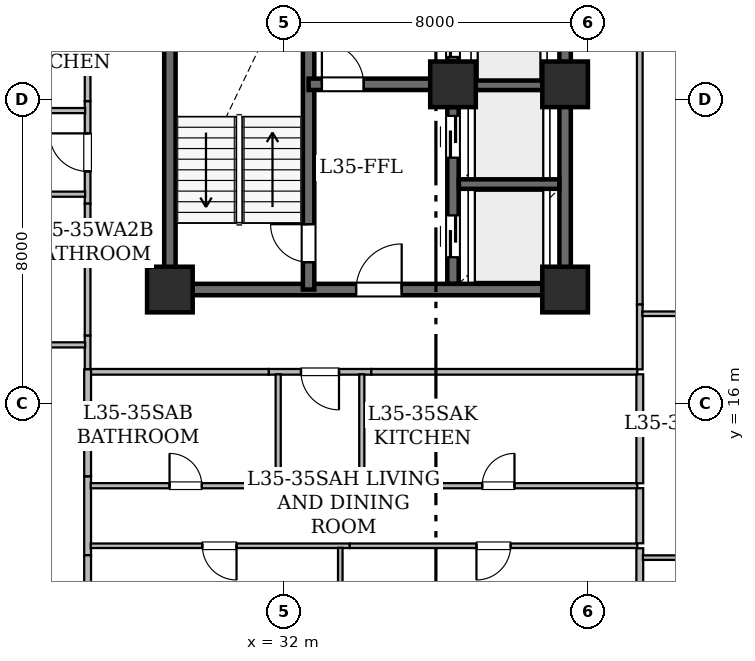
"""IFC4 building model, lengths in metres.
Left out: names, types, materials, properties, quantities, classifications, styles, units other than length and angle.
Written with IfcOpenShell. Run it as: python <this file> out.ifc"""

import sys

from ifc_helpers import new_model, si_unit, direction, frame, frame_2d, origin, origin_2d, place, context, subcontext, project, spatial, rectangle, hollow_rectangle, extrude, element, fill, save


model = new_model("IFC4")
c1 = context("Model", 3, precision=1e-05, world=origin(), true_north=direction((0.0, 1.0)))
c2 = subcontext(c1, "Body", "Model", "MODEL_VIEW")
j1 = project(units=[si_unit("LENGTHUNIT", "METRE"), si_unit("PLANEANGLEUNIT", "RADIAN")], contexts=[c1])
p1 = place(None, origin())
s1 = spatial("IfcSite", under=j1, at=p1, CompositionType="ELEMENT")
p2 = place(p1, origin())
s2 = spatial("IfcBuilding", under=s1, at=p2, CompositionType="ELEMENT")
p3 = place(p2, frame((0.0, 0.0, 138.4)))
s3 = spatial("IfcBuildingStorey", under=s2, at=p3, CompositionType="ELEMENT", Elevation=138.4)
for number, where, z_axis, x_axis in (
    (1, (29.0, 19.0, 0.0), (0.0, 0.0, 1.0), (1.0, 0.0, 0.0)),
    (2, (39.4, 19.0, 0.0), (0.0, 0.0, 1.0), (1.0, 0.0, 0.0)),
    (3, (36.45, 24.4, 0.0), (0.0, 0.0, 1.0), (1.0, 0.0, 0.0)),
    (4, (39.4, 24.4, 0.0), (0.0, 0.0, 1.0), (1.0, 0.0, 0.0)),
):
    element("IfcColumn", number, at=place(p3, frame(where, z_axis=z_axis, x_axis=x_axis)), inside=s3, PredefinedType="COLUMN", context=c2, shape_type="SweptSolid", body=[
        extrude(hollow_rectangle(XDim=1.2, YDim=1.2, WallThickness=0.06, at=origin_2d()), origin(), (0.0, 0.0, 1.0), 3.65),
    ])
p4 = place(p3, frame((29.0, 19.0, 0.0), z_axis=(0.0, 0.0, 1.0), x_axis=(0.0, 1.0, 0.0)))
e5 = element("IfcWall", 5, at=p4, inside=s3, PredefinedType="SHEAR", context=c2, shape_type="SweptSolid", body=[
    extrude(rectangle(XDim=9.0, YDim=0.3, at=frame_2d((4.5, 0.0))), origin(), (0.0, 0.0, 1.0), 3.43),
])
p5 = place(p3, frame((29.0, 19.0, 0.0), z_axis=(0.0, 0.0, 1.0), x_axis=(1.0, 0.0, 0.0)))
e6 = element("IfcWall", 6, at=p5, inside=s3, PredefinedType="SHEAR", context=c2, shape_type="SweptSolid", body=[
    extrude(rectangle(XDim=10.4, YDim=0.3, at=frame_2d((5.2, 0.0))), origin(), (0.0, 0.0, 1.0), 3.43),
])
p6 = place(p5, frame((4.9, 0.0, 0.0)))
e7 = element("IfcOpeningElement", 7, at=p6, cuts=e6, PredefinedType="OPENING", context=c2, shape_type="SweptSolid", body=[
    extrude(rectangle(XDim=1.2, YDim=2.15, at=frame_2d((0.6, 1.075))), frame((0.0, 0.16, 0.0), z_axis=(0.0, -1.0, 0.0), x_axis=(1.0, 0.0, 0.0)), (0.0, 0.0, 1.0), 0.32),
])
p7 = place(p3, frame((39.4, 19.0, 0.0), z_axis=(0.0, 0.0, 1.0), x_axis=(0.0, 1.0, 0.0)))
e8 = element("IfcWall", 8, at=p7, inside=s3, PredefinedType="SHEAR", context=c2, shape_type="SweptSolid", body=[
    extrude(rectangle(XDim=5.4, YDim=0.3, at=frame_2d((2.7, 0.0))), origin(), (0.0, 0.0, 1.0), 3.43),
])
p8 = place(p3, frame((39.4, 24.4, 0.0), z_axis=(0.0, 0.0, 1.0), x_axis=(0.0, 1.0, 0.0)))
e9 = element("IfcWall", 9, at=p8, inside=s3, PredefinedType="SHEAR", context=c2, shape_type="SweptSolid", body=[
    extrude(rectangle(XDim=12.6, YDim=0.3, at=frame_2d((6.3, 0.0))), origin(), (0.0, 0.0, 1.0), 3.43),
])
p9 = place(p3, frame((32.65, 19.0, 0.0), z_axis=(0.0, 0.0, 1.0), x_axis=(0.0, 1.0, 0.0)))
e10 = element("IfcWall", 10, at=p9, inside=s3, PredefinedType="SHEAR", context=c2, shape_type="SweptSolid", body=[
    extrude(rectangle(XDim=9.0, YDim=0.3, at=frame_2d((4.5, 0.0))), origin(), (0.0, 0.0, 1.0), 3.43),
])
p10 = place(p9, frame((0.72, 0.0, 0.0)))
e11 = element("IfcOpeningElement", 11, at=p10, cuts=e10, PredefinedType="OPENING", context=c2, shape_type="SweptSolid", body=[
    extrude(rectangle(XDim=1.0, YDim=2.15, at=frame_2d((0.5, 1.075))), frame((0.0, 0.16, 0.0), z_axis=(0.0, -1.0, 0.0), x_axis=(1.0, 0.0, 0.0)), (0.0, 0.0, 1.0), 0.32),
])
p11 = place(p3, frame((32.65, 24.4, 0.0), z_axis=(0.0, 0.0, 1.0), x_axis=(1.0, 0.0, 0.0)))
e12 = element("IfcWall", 12, at=p11, inside=s3, PredefinedType="SHEAR", context=c2, shape_type="SweptSolid", body=[
    extrude(rectangle(XDim=3.8, YDim=0.3, at=frame_2d((1.9, 0.0))), origin(), (0.0, 0.0, 1.0), 3.43),
])
p12 = place(p11, frame((0.35, 0.0, 0.0)))
e13 = element("IfcOpeningElement", 13, at=p12, cuts=e12, PredefinedType="OPENING", context=c2, shape_type="SweptSolid", body=[
    extrude(rectangle(XDim=1.1, YDim=2.15, at=frame_2d((0.55, 1.075))), frame((0.0, 0.16, 0.0), z_axis=(0.0, -1.0, 0.0), x_axis=(1.0, 0.0, 0.0)), (0.0, 0.0, 1.0), 0.32),
])
p13 = place(p3, frame((36.45, 19.154, 0.0), z_axis=(0.0, 0.0, 1.0), x_axis=(0.0, 1.0, 0.0)))
e14 = element("IfcWall", 14, at=p13, inside=s3, PredefinedType="SHEAR", context=c2, shape_type="SweptSolid", body=[
    extrude(rectangle(XDim=4.646, YDim=0.3, at=frame_2d((2.323, 0.0))), origin(), (0.0, 0.0, 1.0), 3.43),
])
p14 = place(p13, frame((0.696, 0.0, 0.0)))
e15 = element("IfcOpeningElement", 15, at=p14, cuts=e14, PredefinedType="OPENING", context=c2, shape_type="SweptSolid", body=[
    extrude(rectangle(XDim=1.1, YDim=2.15, at=frame_2d((0.55, 1.075))), frame((0.0, 0.16, 0.0), z_axis=(0.0, -1.0, 0.0), x_axis=(1.0, 0.0, 0.0)), (0.0, 0.0, 1.0), 0.32),
])
p15 = place(p13, frame((3.316, 0.0, 0.0)))
e16 = element("IfcOpeningElement", 16, at=p15, cuts=e14, PredefinedType="OPENING", context=c2, shape_type="SweptSolid", body=[
    extrude(rectangle(XDim=1.1, YDim=2.15, at=frame_2d((0.55, 1.075))), frame((0.0, 0.16, 0.0), z_axis=(0.0, -1.0, 0.0), x_axis=(1.0, 0.0, 0.0)), (0.0, 0.0, 1.0), 0.32),
])
p16 = place(p3, frame((36.45, 25.0, 0.0), z_axis=(0.0, 0.0, 1.0), x_axis=(0.0, 1.0, 0.0)))
e17 = element("IfcWall", 17, at=p16, inside=s3, PredefinedType="SHEAR", context=c2, shape_type="SweptSolid", body=[
    extrude(rectangle(XDim=5.15, YDim=0.3, at=frame_2d((2.575, 0.0))), origin(), (0.0, 0.0, 1.0), 3.43),
])
p17 = place(p16, frame((0.12, 0.0, 0.0)))
e18 = element("IfcOpeningElement", 18, at=p17, cuts=e17, PredefinedType="OPENING", context=c2, shape_type="SweptSolid", body=[
    extrude(rectangle(XDim=1.05, YDim=2.15, at=frame_2d((0.525, 1.075))), frame((0.0, 0.16, 0.0), z_axis=(0.0, -1.0, 0.0), x_axis=(1.0, 0.0, 0.0)), (0.0, 0.0, 1.0), 0.32),
])
p18 = place(p16, frame((2.095, 0.0, 0.0)))
e19 = element("IfcOpeningElement", 19, at=p18, cuts=e17, PredefinedType="OPENING", context=c2, shape_type="SweptSolid", body=[
    extrude(rectangle(XDim=1.05, YDim=2.15, at=frame_2d((0.525, 1.075))), frame((0.0, 0.16, 0.0), z_axis=(0.0, -1.0, 0.0), x_axis=(1.0, 0.0, 0.0)), (0.0, 0.0, 1.0), 0.32),
])
p19 = place(p16, frame((3.98, 0.0, 0.0)))
e20 = element("IfcOpeningElement", 20, at=p19, cuts=e17, PredefinedType="OPENING", context=c2, shape_type="SweptSolid", body=[
    extrude(rectangle(XDim=1.05, YDim=2.15, at=frame_2d((0.525, 1.075))), frame((0.0, 0.16, 0.0), z_axis=(0.0, -1.0, 0.0), x_axis=(1.0, 0.0, 0.0)), (0.0, 0.0, 1.0), 0.32),
])
for number, where, z_axis, x_axis in (
    (21, (36.604, 21.775, 0.0), (0.0, 0.0, 1.0), (1.0, 0.0, 0.0)),
    (22, (36.604, 24.375, 0.0), (0.0, 0.0, 1.0), (1.0, 0.0, 0.0)),
):
    element("IfcWall", number, at=place(p3, frame(where, z_axis=z_axis, x_axis=x_axis)), inside=s3, PredefinedType="SHEAR", context=c2, shape_type="SweptSolid", body=[
        extrude(rectangle(XDim=2.642, YDim=0.25, at=frame_2d((1.321, 0.0))), origin(), (0.0, 0.0, 1.0), 3.43),
    ])
p20 = place(p3, frame((26.835, 16.9, 0.0), z_axis=(0.0, 0.0, 1.0), x_axis=(0.0, 1.0, 0.0)))
e23 = element("IfcWall", 23, at=p20, inside=s3, PredefinedType="STANDARD", context=c2, shape_type="SweptSolid", body=[
    extrude(rectangle(XDim=0.893, YDim=0.15, at=frame_2d((0.447, 0.0))), origin(), (0.0, 0.0, 1.0), 3.43),
])
p21 = place(p3, frame((26.835, 21.26, 0.0), z_axis=(0.0, 0.0, 1.0), x_axis=(0.0, 1.0, 0.0)))
e24 = element("IfcWall", 24, at=p21, inside=s3, PredefinedType="STANDARD", context=c2, shape_type="SweptSolid", body=[
    extrude(rectangle(XDim=2.698, YDim=0.15, at=frame_2d((1.349, 0.0))), origin(), (0.0, 0.0, 1.0), 3.43),
])
p22 = place(p21, frame((0.849, 0.0, 0.0)))
e25 = element("IfcOpeningElement", 25, at=p22, cuts=e24, PredefinedType="OPENING", context=c2, shape_type="SweptSolid", body=[
    extrude(rectangle(XDim=1.0, YDim=2.15, at=frame_2d((0.5, 1.075))), frame((0.0, 0.085, 0.0), z_axis=(0.0, -1.0, 0.0), x_axis=(1.0, 0.0, 0.0)), (0.0, 0.0, 1.0), 0.17),
])
p23 = place(p3, frame((26.835, 17.793, 0.0), z_axis=(0.0, 0.0, 1.0), x_axis=(0.0, 1.0, 0.0)))
e26 = element("IfcWall", 26, at=p23, inside=s3, PredefinedType="STANDARD", context=c2, shape_type="SweptSolid", body=[
    extrude(rectangle(XDim=3.467, YDim=0.15, at=frame_2d((1.733, 0.0))), origin(), (0.0, 0.0, 1.0), 2.647),
])
p24 = place(p3, frame((26.835, 23.958, 0.0), z_axis=(0.0, 0.0, 1.0), x_axis=(0.0, 1.0, 0.0)))
e27 = element("IfcWall", 27, at=p24, inside=s3, PredefinedType="STANDARD", context=c2, shape_type="SweptSolid", body=[
    extrude(rectangle(XDim=6.992, YDim=0.15, at=frame_2d((3.496, 0.0))), origin(), (0.0, 0.0, 1.0), 3.013),
])
p25 = place(p3, frame((34.299, 16.835, 0.0), z_axis=(0.0, 0.0, 1.0), x_axis=(-1.0, 0.0, 0.0)))
e28 = element("IfcWall", 28, at=p25, inside=s3, PredefinedType="STANDARD", context=c2, shape_type="SweptSolid", body=[
    extrude(rectangle(XDim=2.698, YDim=0.15, at=frame_2d((1.349, 0.0))), origin(), (0.0, 0.0, 1.0), 3.43),
])
p26 = place(p25, frame((0.849, 0.0, 0.0)))
e29 = element("IfcOpeningElement", 29, at=p26, cuts=e28, PredefinedType="OPENING", context=c2, shape_type="SweptSolid", body=[
    extrude(rectangle(XDim=1.0, YDim=2.15, at=frame_2d((0.5, 1.075))), frame((0.0, 0.085, 0.0), z_axis=(0.0, -1.0, 0.0), x_axis=(1.0, 0.0, 0.0)), (0.0, 0.0, 1.0), 0.17),
])
p27 = place(p3, frame((31.601, 16.835, 0.0), z_axis=(0.0, 0.0, 1.0), x_axis=(-1.0, 0.0, 0.0)))
e30 = element("IfcWall", 30, at=p27, inside=s3, PredefinedType="STANDARD", context=c2, shape_type="SweptSolid", body=[
    extrude(rectangle(XDim=4.701, YDim=0.15, at=frame_2d((2.351, 0.0))), origin(), (0.0, 0.0, 1.0), 2.647),
])
p28 = place(p3, frame((41.3, 16.835, 0.0), z_axis=(0.0, 0.0, 1.0), x_axis=(-1.0, 0.0, 0.0)))
e31 = element("IfcWall", 31, at=p28, inside=s3, PredefinedType="STANDARD", context=c2, shape_type="SweptSolid", body=[
    extrude(rectangle(XDim=7.001, YDim=0.15, at=frame_2d((3.5, 0.0))), origin(), (0.0, 0.0, 1.0), 2.647),
])
p29 = place(p3, frame((41.365, 18.612, 0.0), z_axis=(0.0, 0.0, 1.0), x_axis=(0.0, -1.0, 0.0)))
e32 = element("IfcWall", 32, at=p29, inside=s3, PredefinedType="STANDARD", context=c2, shape_type="SweptSolid", body=[
    extrude(rectangle(XDim=1.712, YDim=0.15, at=frame_2d((0.856, 0.0))), origin(), (0.0, 0.0, 1.0), 2.647),
])
p30 = place(p3, frame((41.365, 25.576, 0.0), z_axis=(0.0, 0.0, 1.0), x_axis=(0.0, -1.0, 0.0)))
e33 = element("IfcWall", 33, at=p30, inside=s3, PredefinedType="STANDARD", context=c2, shape_type="SweptSolid", body=[
    extrude(rectangle(XDim=6.964, YDim=0.15, at=frame_2d((3.482, 0.0))), origin(), (0.0, 0.0, 1.0), 2.647),
])
p31 = place(p3, frame((24.163, 17.544, 0.0), z_axis=(0.0, 0.0, 1.0), x_axis=(1.0, 0.0, 0.0)))
e34 = element("IfcWall", 34, at=p31, inside=s3, PredefinedType="PARTITIONING", context=c2, shape_type="SweptSolid", body=[
    extrude(rectangle(XDim=2.607, YDim=0.135, at=frame_2d((1.303, 0.0))), origin(), (0.0, 0.0, 1.0), 3.43),
])
p32 = place(p3, frame((26.835, 14.087, 0.0), z_axis=(0.0, 0.0, 1.0), x_axis=(0.0, -1.0, 0.0)))
e35 = element("IfcWall", 35, at=p32, inside=s3, PredefinedType="STANDARD", context=c2, shape_type="SweptSolid", body=[
    extrude(rectangle(XDim=2.078, YDim=0.18, at=frame_2d((1.039, 0.0))), origin(), (0.0, 0.0, 1.0), 3.43),
])
p33 = place(p3, frame((26.835, 16.9, 0.0), z_axis=(0.0, 0.0, 1.0), x_axis=(0.0, -1.0, 0.0)))
e36 = element("IfcWall", 36, at=p33, inside=s3, PredefinedType="STANDARD", context=c2, shape_type="SweptSolid", body=[
    extrude(rectangle(XDim=2.813, YDim=0.18, at=frame_2d((1.406, 0.0))), origin(), (0.0, 0.0, 1.0), 3.43),
])
p34 = place(p3, frame((26.835, 12.009, 0.0), z_axis=(0.0, 0.0, 1.0), x_axis=(0.0, -1.0, 0.0)))
e37 = element("IfcWall", 37, at=p34, inside=s3, PredefinedType="STANDARD", context=c2, shape_type="SweptSolid", body=[
    extrude(rectangle(XDim=5.397, YDim=0.18, at=frame_2d((2.698, 0.0))), origin(), (0.0, 0.0, 1.0), 2.876),
])
for number, where, z_axis, x_axis in (
    (38, (26.77, 21.509, 0.0), (0.0, 0.0, 1.0), (-1.0, 0.0, 0.0)),
    (39, (24.033, 23.709, 0.0), (0.0, 0.0, 1.0), (1.0, 0.0, 0.0)),
):
    element("IfcWall", number, at=place(p3, frame(where, z_axis=z_axis, x_axis=x_axis)), inside=s3, PredefinedType="PARTITIONING", context=c2, shape_type="SweptSolid", body=[
        extrude(rectangle(XDim=2.737, YDim=0.135, at=frame_2d((1.369, 0.0))), origin(), (0.0, 0.0, 1.0), 3.43),
    ])
p35 = place(p3, frame((26.917, 13.838, 0.0), z_axis=(0.0, 0.0, 1.0), x_axis=(1.0, 0.0, 0.0)))
e40 = element("IfcWall", 40, at=p35, inside=s3, PredefinedType="PARTITIONING", context=c2, shape_type="SweptSolid", body=[
    extrude(rectangle(XDim=4.998, YDim=0.135, at=frame_2d((2.499, 0.0))), origin(), (0.0, 0.0, 1.0), 2.647),
])
p36 = place(p35, frame((2.074, 0.0, 0.0)))
e41 = element("IfcOpeningElement", 41, at=p36, cuts=e40, PredefinedType="OPENING", context=c2, shape_type="SweptSolid", body=[
    extrude(rectangle(XDim=0.85, YDim=2.1, at=frame_2d((0.425, 1.05))), frame((0.0, 0.077, 0.0), z_axis=(0.0, -1.0, 0.0), x_axis=(1.0, 0.0, 0.0)), (0.0, 0.0, 1.0), 0.155),
])
for number, where, z_axis, x_axis in (
    (42, (31.85, 13.773, 0.0), (0.0, 0.0, 1.0), (0.0, 1.0, 0.0)),
    (43, (34.05, 16.77, 0.0), (0.0, 0.0, 1.0), (0.0, -1.0, 0.0)),
):
    element("IfcWall", number, at=place(p3, frame(where, z_axis=z_axis, x_axis=x_axis)), inside=s3, PredefinedType="PARTITIONING", context=c2, shape_type="SweptSolid", body=[
        extrude(rectangle(XDim=2.997, YDim=0.135, at=frame_2d((1.499, 0.0))), origin(), (0.0, 0.0, 1.0), 3.43),
    ])
p37 = place(p3, frame((33.985, 13.838, 0.0), z_axis=(0.0, 0.0, 1.0), x_axis=(1.0, 0.0, 0.0)))
e44 = element("IfcWall", 44, at=p37, inside=s3, PredefinedType="PARTITIONING", context=c2, shape_type="SweptSolid", body=[
    extrude(rectangle(XDim=7.315, YDim=0.135, at=frame_2d((3.657, 0.0))), origin(), (0.0, 0.0, 1.0), 2.647),
])
p38 = place(p37, frame((3.233, 0.0, 0.0)))
e45 = element("IfcOpeningElement", 45, at=p38, cuts=e44, PredefinedType="OPENING", context=c2, shape_type="SweptSolid", body=[
    extrude(rectangle(XDim=0.85, YDim=2.1, at=frame_2d((0.425, 1.05))), frame((0.0, 0.077, 0.0), z_axis=(0.0, -1.0, 0.0), x_axis=(1.0, 0.0, 0.0)), (0.0, 0.0, 1.0), 0.155),
])
p39 = place(p3, frame((33.734, 12.258, 0.0), z_axis=(0.0, 0.0, 1.0), x_axis=(-1.0, 0.0, 0.0)))
e46 = element("IfcWall", 46, at=p39, inside=s3, PredefinedType="PARTITIONING", context=c2, shape_type="SweptSolid", body=[
    extrude(rectangle(XDim=6.817, YDim=0.12, at=frame_2d((3.408, 0.0))), origin(), (0.0, 0.0, 1.0), 2.647),
])
p40 = place(p39, frame((2.98, 0.0, 0.0)))
e47 = element("IfcOpeningElement", 47, at=p40, cuts=e46, PredefinedType="OPENING", context=c2, shape_type="SweptSolid", body=[
    extrude(rectangle(XDim=0.9, YDim=2.1, at=frame_2d((0.45, 1.05))), frame((0.0, 0.07, 0.0), z_axis=(0.0, -1.0, 0.0), x_axis=(1.0, 0.0, 0.0)), (0.0, 0.0, 1.0), 0.14),
])
p41 = place(p3, frame((41.3, 12.258, 0.0), z_axis=(0.0, 0.0, 1.0), x_axis=(-1.0, 0.0, 0.0)))
e48 = element("IfcWall", 48, at=p41, inside=s3, PredefinedType="PARTITIONING", context=c2, shape_type="SweptSolid", body=[
    extrude(rectangle(XDim=7.566, YDim=0.12, at=frame_2d((3.783, 0.0))), origin(), (0.0, 0.0, 1.0), 2.647),
])
p42 = place(p41, frame((3.333, 0.0, 0.0)))
e49 = element("IfcOpeningElement", 49, at=p42, cuts=e48, PredefinedType="OPENING", context=c2, shape_type="SweptSolid", body=[
    extrude(rectangle(XDim=0.9, YDim=2.1, at=frame_2d((0.45, 1.05))), frame((0.0, 0.07, 0.0), z_axis=(0.0, -1.0, 0.0), x_axis=(1.0, 0.0, 0.0)), (0.0, 0.0, 1.0), 0.14),
])
p43 = place(p3, frame((41.365, 13.773, 0.0), z_axis=(0.0, 0.0, 1.0), x_axis=(0.0, -1.0, 0.0)))
e50 = element("IfcWall", 50, at=p43, inside=s3, PredefinedType="STANDARD", context=c2, shape_type="SweptSolid", body=[
    extrude(rectangle(XDim=1.45, YDim=0.18, at=frame_2d((0.725, 0.0))), origin(), (0.0, 0.0, 1.0), 3.43),
])
p44 = place(p3, frame((41.365, 16.77, 0.0), z_axis=(0.0, 0.0, 1.0), x_axis=(0.0, -1.0, 0.0)))
e51 = element("IfcWall", 51, at=p44, inside=s3, PredefinedType="STANDARD", context=c2, shape_type="SweptSolid", body=[
    extrude(rectangle(XDim=2.867, YDim=0.18, at=frame_2d((1.434, 0.0))), origin(), (0.0, 0.0, 1.0), 3.43),
])
p45 = place(p3, frame((33.484, 12.204, 0.0), z_axis=(0.0, 0.0, 1.0), x_axis=(0.0, -1.0, 0.0)))
e52 = element("IfcWall", 52, at=p45, inside=s3, PredefinedType="PARTITIONING", context=c2, shape_type="SweptSolid", body=[
    extrude(rectangle(XDim=5.592, YDim=0.12, at=frame_2d((2.796, 0.0))), origin(), (0.0, 0.0, 1.0), 2.876),
])
p46 = place(p3, frame((41.365, 12.193, 0.0), z_axis=(0.0, 0.0, 1.0), x_axis=(0.0, -1.0, 0.0)))
e53 = element("IfcWall", 53, at=p46, inside=s3, PredefinedType="STANDARD", context=c2, shape_type="SweptSolid", body=[
    extrude(rectangle(XDim=5.581, YDim=0.18, at=frame_2d((2.791, 0.0))), origin(), (0.0, 0.0, 1.0), 2.876),
])
p47 = place(p3, frame((41.447, 11.946, 0.0), z_axis=(0.0, 0.0, 1.0), x_axis=(1.0, 0.0, 0.0)))
e54 = element("IfcWall", 54, at=p47, inside=s3, PredefinedType="PARTITIONING", context=c2, shape_type="SweptSolid", body=[
    extrude(rectangle(XDim=6.674, YDim=0.12, at=frame_2d((3.337, 0.0))), origin(), (0.0, 0.0, 1.0), 3.43),
])
p48 = place(p3, frame((41.432, 18.363, 0.0), z_axis=(0.0, 0.0, 1.0), x_axis=(1.0, 0.0, 0.0)))
e55 = element("IfcWall", 55, at=p48, inside=s3, PredefinedType="PARTITIONING", context=c2, shape_type="SweptSolid", body=[
    extrude(rectangle(XDim=6.689, YDim=0.12, at=frame_2d((3.345, 0.0))), origin(), (0.0, 0.0, 1.0), 2.647),
])
p49 = place(p10, origin())
e56 = element("IfcDoor", 56, at=p49, inside=s3, OperationType="SINGLE_SWING_RIGHT", PredefinedType="DOOR", context=c2, shape_type="SweptSolid", body=[
    extrude(rectangle(XDim=1.0, YDim=2.15, at=frame_2d((0.5, 1.075))), frame((0.0, 0.025, 0.0), z_axis=(0.0, -1.0, 0.0), x_axis=(1.0, 0.0, 0.0)), (0.0, 0.0, 1.0), 0.05),
])
fill(e11, e56)
p50 = place(p12, origin())
e57 = element("IfcDoor", 57, at=p50, inside=s3, OperationType="SINGLE_SWING_LEFT", PredefinedType="DOOR", context=c2, shape_type="SweptSolid", body=[
    extrude(rectangle(XDim=1.1, YDim=2.15, at=frame_2d((0.55, 1.075))), frame((0.0, 0.025, 0.0), z_axis=(0.0, -1.0, 0.0), x_axis=(1.0, 0.0, 0.0)), (0.0, 0.0, 1.0), 0.05),
])
fill(e13, e57)
p51 = place(p6, origin())
e58 = element("IfcDoor", 58, at=p51, inside=s3, OperationType="SINGLE_SWING_RIGHT", PredefinedType="DOOR", context=c2, shape_type="SweptSolid", body=[
    extrude(rectangle(XDim=1.2, YDim=2.15, at=frame_2d((0.6, 1.075))), frame((0.0, 0.025, 0.0), z_axis=(0.0, -1.0, 0.0), x_axis=(1.0, 0.0, 0.0)), (0.0, 0.0, 1.0), 0.05),
])
fill(e7, e58)
p52 = place(p14, origin())
e59 = element("IfcDoor", 59, at=p52, inside=s3, OperationType="SLIDING_TO_LEFT", PredefinedType="DOOR", context=c2, shape_type="SweptSolid", body=[
    extrude(rectangle(XDim=1.1, YDim=2.15, at=frame_2d((0.55, 1.075))), frame((0.0, 0.025, 0.0), z_axis=(0.0, -1.0, 0.0), x_axis=(1.0, 0.0, 0.0)), (0.0, 0.0, 1.0), 0.05),
])
fill(e15, e59)
p53 = place(p15, origin())
e60 = element("IfcDoor", 60, at=p53, inside=s3, OperationType="SLIDING_TO_LEFT", PredefinedType="DOOR", context=c2, shape_type="SweptSolid", body=[
    extrude(rectangle(XDim=1.1, YDim=2.15, at=frame_2d((0.55, 1.075))), frame((0.0, 0.025, 0.0), z_axis=(0.0, -1.0, 0.0), x_axis=(1.0, 0.0, 0.0)), (0.0, 0.0, 1.0), 0.05),
])
fill(e16, e60)
p54 = place(p17, origin())
e61 = element("IfcDoor", 61, at=p54, inside=s3, OperationType="SLIDING_TO_LEFT", PredefinedType="DOOR", context=c2, shape_type="SweptSolid", body=[
    extrude(rectangle(XDim=1.05, YDim=2.15, at=frame_2d((0.525, 1.075))), frame((0.0, 0.025, 0.0), z_axis=(0.0, -1.0, 0.0), x_axis=(1.0, 0.0, 0.0)), (0.0, 0.0, 1.0), 0.05),
])
fill(e18, e61)
p55 = place(p22, origin())
e62 = element("IfcDoor", 62, at=p55, inside=s3, OperationType="SINGLE_SWING_RIGHT", PredefinedType="DOOR", context=c2, shape_type="SweptSolid", body=[
    extrude(rectangle(XDim=1.0, YDim=2.15, at=frame_2d((0.5, 1.075))), frame((0.0, 0.025, 0.0), z_axis=(0.0, -1.0, 0.0), x_axis=(1.0, 0.0, 0.0)), (0.0, 0.0, 1.0), 0.05),
])
fill(e25, e62)
p56 = place(p26, origin())
e63 = element("IfcDoor", 63, at=p56, inside=s3, OperationType="SINGLE_SWING_LEFT", PredefinedType="DOOR", context=c2, shape_type="SweptSolid", body=[
    extrude(rectangle(XDim=1.0, YDim=2.15, at=frame_2d((0.5, 1.075))), frame((0.0, 0.025, 0.0), z_axis=(0.0, -1.0, 0.0), x_axis=(1.0, 0.0, 0.0)), (0.0, 0.0, 1.0), 0.05),
])
fill(e29, e63)
p57 = place(p36, origin())
e64 = element("IfcDoor", 64, at=p57, inside=s3, OperationType="SINGLE_SWING_LEFT", PredefinedType="DOOR", context=c2, shape_type="SweptSolid", body=[
    extrude(rectangle(XDim=0.85, YDim=2.1, at=frame_2d((0.425, 1.05))), frame((0.0, 0.025, 0.0), z_axis=(0.0, -1.0, 0.0), x_axis=(1.0, 0.0, 0.0)), (0.0, 0.0, 1.0), 0.05),
])
fill(e41, e64)
p58 = place(p38, origin())
e65 = element("IfcDoor", 65, at=p58, inside=s3, OperationType="SINGLE_SWING_RIGHT", PredefinedType="DOOR", context=c2, shape_type="SweptSolid", body=[
    extrude(rectangle(XDim=0.85, YDim=2.1, at=frame_2d((0.425, 1.05))), frame((0.0, 0.025, 0.0), z_axis=(0.0, -1.0, 0.0), x_axis=(1.0, 0.0, 0.0)), (0.0, 0.0, 1.0), 0.05),
])
fill(e45, e65)
p59 = place(p40, origin())
e66 = element("IfcDoor", 66, at=p59, inside=s3, OperationType="SINGLE_SWING_LEFT", PredefinedType="DOOR", context=c2, shape_type="SweptSolid", body=[
    extrude(rectangle(XDim=0.9, YDim=2.1, at=frame_2d((0.45, 1.05))), frame((0.0, 0.025, 0.0), z_axis=(0.0, -1.0, 0.0), x_axis=(1.0, 0.0, 0.0)), (0.0, 0.0, 1.0), 0.05),
])
fill(e47, e66)
p60 = place(p42, origin())
e67 = element("IfcDoor", 67, at=p60, inside=s3, OperationType="SINGLE_SWING_RIGHT", PredefinedType="DOOR", context=c2, shape_type="SweptSolid", body=[
    extrude(rectangle(XDim=0.9, YDim=2.1, at=frame_2d((0.45, 1.05))), frame((0.0, 0.025, 0.0), z_axis=(0.0, -1.0, 0.0), x_axis=(1.0, 0.0, 0.0)), (0.0, 0.0, 1.0), 0.05),
])
fill(e49, e67)
save(model, sys.argv[1])
